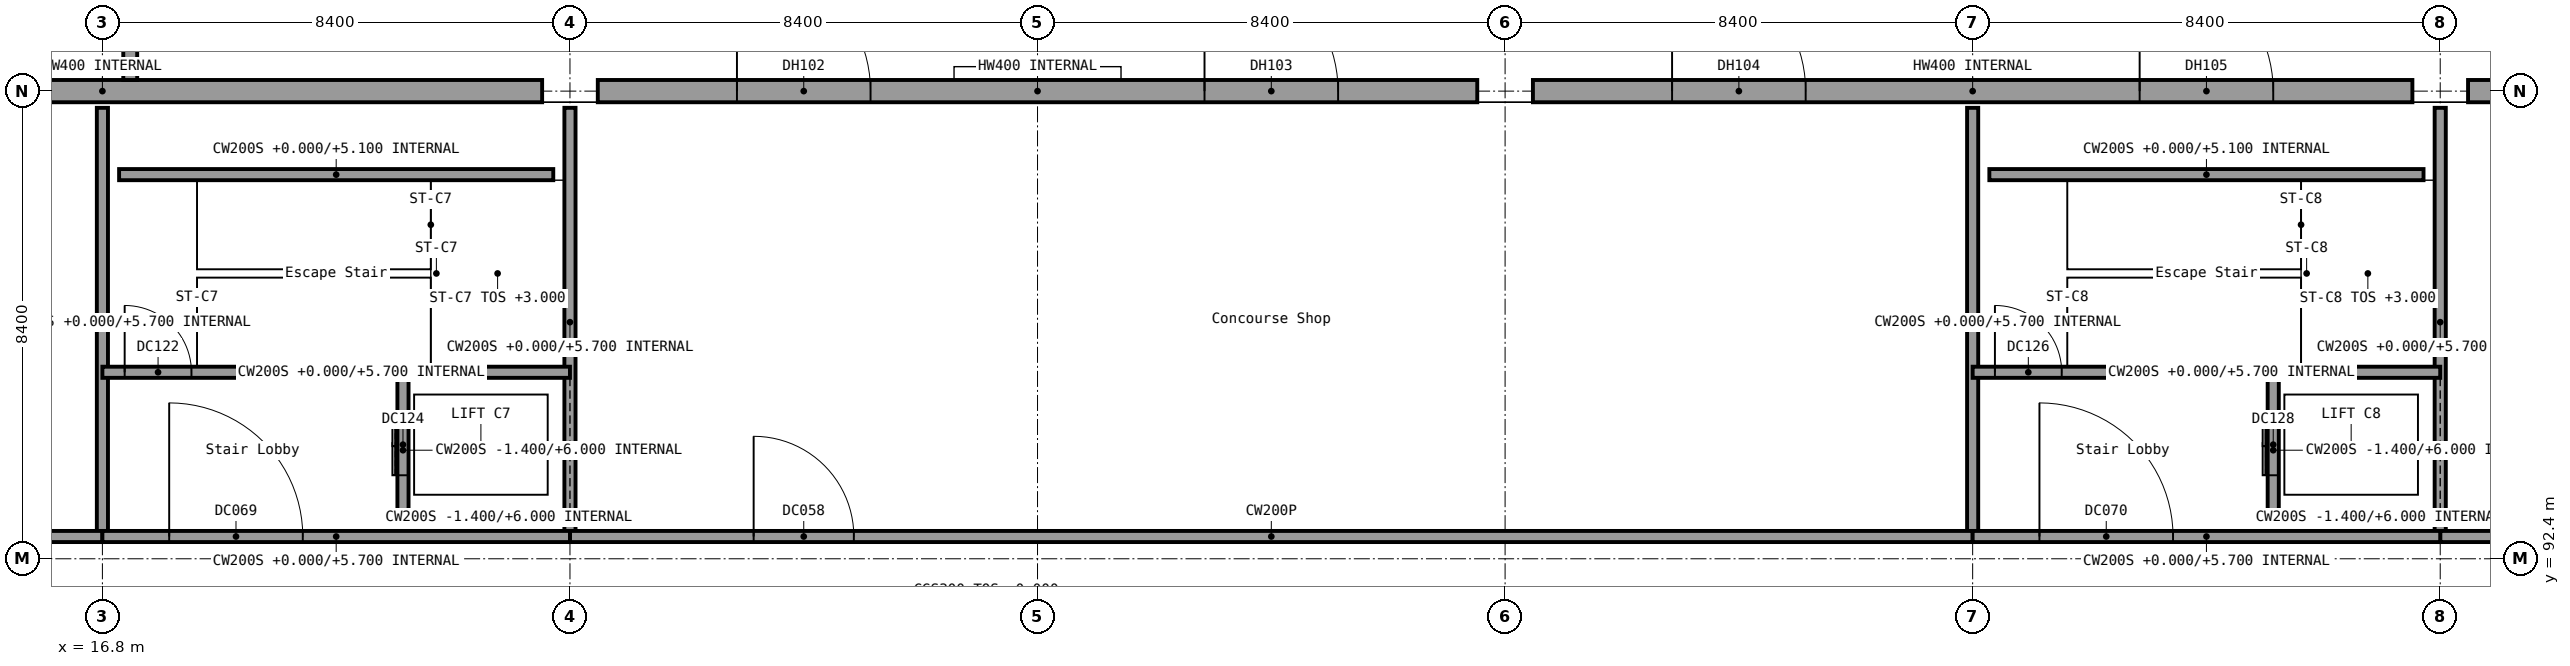
"""IFC4 building model, lengths in metres.
Left out: names, types, materials, properties, quantities, classifications, styles, units other than length and angle.
Written with IfcOpenShell. Run it as: python <this file> out.ifc"""

import sys

from ifc_helpers import new_model, si_unit, direction, frame, frame_2d, origin, origin_2d, place, context, subcontext, project, spatial, rectangle, extrude, element, fill, save


model = new_model("IFC4")
c1 = context("Model", 3, precision=1e-05, world=origin(), true_north=direction((0.0, 1.0)))
c2 = subcontext(c1, "Body", "Model", "MODEL_VIEW")
j1 = project(units=[si_unit("LENGTHUNIT", "METRE"), si_unit("PLANEANGLEUNIT", "RADIAN")], contexts=[c1])
p1 = place(None, origin())
s1 = spatial("IfcSite", under=j1, at=p1, CompositionType="ELEMENT")
p2 = place(p1, origin())
s2 = spatial("IfcBuilding", under=s1, at=p2, CompositionType="ELEMENT")
p3 = place(p2, origin())
s3 = spatial("IfcBuildingStorey", under=s2, at=p3, CompositionType="ELEMENT", Elevation=0.0)
for number, where, z_axis, x_axis in (
    (1, (25.2, 100.8, 0.0), (0.0, 0.0, 1.0), (1.0, 0.0, 0.0)),
    (2, (42.0, 100.8, 0.0), (0.0, 0.0, 1.0), (1.0, 0.0, 0.0)),
    (3, (58.8, 100.8, 0.0), (0.0, 0.0, 1.0), (1.0, 0.0, 0.0)),
):
    element("IfcColumn", number, at=place(p3, frame(where, z_axis=z_axis, x_axis=x_axis)), inside=s3, PredefinedType="COLUMN", context=c2, shape_type="SweptSolid", body=[
        extrude(rectangle(XDim=1.0, YDim=1.6, at=origin_2d()), origin(), (0.0, 0.0, 1.0), 6.0),
    ])
p4 = place(p3, frame((8.9, 100.8, 0.0), z_axis=(0.0, 0.0, 1.0), x_axis=(1.0, 0.0, 0.0)))
e4 = element("IfcWall", 4, at=p4, inside=s3, PredefinedType="STANDARD", context=c2, shape_type="SweptSolid", body=[
    extrude(rectangle(XDim=15.8, YDim=0.4, at=frame_2d((7.9, 0.0))), origin(), (0.0, 0.0, 1.0), 4.5),
])
p5 = place(p4, frame((1.137, 0.0, 0.0)))
e5 = element("IfcOpeningElement", 5, at=p5, cuts=e4, PredefinedType="OPENING", context=c2, shape_type="SweptSolid", body=[
    extrude(rectangle(XDim=1.2, YDim=2.1, at=frame_2d((0.6, 1.05))), frame((0.0, 0.2, 0.0), z_axis=(0.0, -1.0, 0.0), x_axis=(1.0, 0.0, 0.0)), (0.0, 0.0, 1.0), 0.4),
])
p6 = place(p3, frame((25.7, 100.8, 0.0), z_axis=(0.0, 0.0, 1.0), x_axis=(1.0, 0.0, 0.0)))
e6 = element("IfcWall", 6, at=p6, inside=s3, PredefinedType="STANDARD", context=c2, shape_type="SweptSolid", body=[
    extrude(rectangle(XDim=15.8, YDim=0.4, at=frame_2d((7.9, 0.0))), origin(), (0.0, 0.0, 1.0), 4.5),
])
p7 = place(p6, frame((2.5, 0.0, 0.0)))
e7 = element("IfcOpeningElement", 7, at=p7, cuts=e6, PredefinedType="OPENING", context=c2, shape_type="SweptSolid", body=[
    extrude(rectangle(XDim=2.4, YDim=2.4, at=frame_2d((1.2, 1.2))), frame((0.0, 0.2, 0.0), z_axis=(0.0, -1.0, 0.0), x_axis=(1.0, 0.0, 0.0)), (0.0, 0.0, 1.0), 0.4),
])
p8 = place(p6, frame((10.9, 0.0, 0.0)))
e8 = element("IfcOpeningElement", 8, at=p8, cuts=e6, PredefinedType="OPENING", context=c2, shape_type="SweptSolid", body=[
    extrude(rectangle(XDim=2.4, YDim=2.4, at=frame_2d((1.2, 1.2))), frame((0.0, 0.2, 0.0), z_axis=(0.0, -1.0, 0.0), x_axis=(1.0, 0.0, 0.0)), (0.0, 0.0, 1.0), 0.4),
])
p9 = place(p3, frame((42.5, 100.8, 0.0), z_axis=(0.0, 0.0, 1.0), x_axis=(1.0, 0.0, 0.0)))
e9 = element("IfcWall", 9, at=p9, inside=s3, PredefinedType="STANDARD", context=c2, shape_type="SweptSolid", body=[
    extrude(rectangle(XDim=15.8, YDim=0.4, at=frame_2d((7.9, 0.0))), origin(), (0.0, 0.0, 1.0), 4.5),
])
p10 = place(p9, frame((2.5, 0.0, 0.0)))
e10 = element("IfcOpeningElement", 10, at=p10, cuts=e9, PredefinedType="OPENING", context=c2, shape_type="SweptSolid", body=[
    extrude(rectangle(XDim=2.4, YDim=2.4, at=frame_2d((1.2, 1.2))), frame((0.0, 0.2, 0.0), z_axis=(0.0, -1.0, 0.0), x_axis=(1.0, 0.0, 0.0)), (0.0, 0.0, 1.0), 0.4),
])
p11 = place(p9, frame((10.9, 0.0, 0.0)))
e11 = element("IfcOpeningElement", 11, at=p11, cuts=e9, PredefinedType="OPENING", context=c2, shape_type="SweptSolid", body=[
    extrude(rectangle(XDim=2.4, YDim=2.4, at=frame_2d((1.2, 1.2))), frame((0.0, 0.2, 0.0), z_axis=(0.0, -1.0, 0.0), x_axis=(1.0, 0.0, 0.0)), (0.0, 0.0, 1.0), 0.4),
])
p12 = place(p3, frame((59.3, 100.8, 0.0), z_axis=(0.0, 0.0, 1.0), x_axis=(1.0, 0.0, 0.0)))
e12 = element("IfcWall", 12, at=p12, inside=s3, PredefinedType="STANDARD", context=c2, shape_type="SweptSolid", body=[
    extrude(rectangle(XDim=15.8, YDim=0.4, at=frame_2d((7.9, 0.0))), origin(), (0.0, 0.0, 1.0), 4.5),
])
p13 = place(p12, frame((2.5, 0.0, 0.0)))
e13 = element("IfcOpeningElement", 13, at=p13, cuts=e12, PredefinedType="OPENING", context=c2, shape_type="SweptSolid", body=[
    extrude(rectangle(XDim=2.4, YDim=2.4, at=frame_2d((1.2, 1.2))), frame((0.0, 0.2, 0.0), z_axis=(0.0, -1.0, 0.0), x_axis=(1.0, 0.0, 0.0)), (0.0, 0.0, 1.0), 0.4),
])
p14 = place(p12, frame((10.9, 0.0, 0.0)))
e14 = element("IfcOpeningElement", 14, at=p14, cuts=e12, PredefinedType="OPENING", context=c2, shape_type="SweptSolid", body=[
    extrude(rectangle(XDim=2.4, YDim=2.4, at=frame_2d((1.2, 1.2))), frame((0.0, 0.2, 0.0), z_axis=(0.0, -1.0, 0.0), x_axis=(1.0, 0.0, 0.0)), (0.0, 0.0, 1.0), 0.4),
])
p15 = place(p3, frame((17.3, 101.0, 0.0), z_axis=(0.0, 0.0, 1.0), x_axis=(0.0, 1.0, 0.0)))
e15 = element("IfcWall", 15, at=p15, inside=s3, PredefinedType="SHEAR", context=c2, shape_type="SweptSolid", body=[
    extrude(rectangle(XDim=8.2, YDim=0.25, at=frame_2d((4.1, 0.0))), origin(), (0.0, 0.0, 1.0), 5.7),
])
p16 = place(p15, frame((2.0, 0.0, 0.0)))
e16 = element("IfcOpeningElement", 16, at=p16, cuts=e15, PredefinedType="OPENING", context=c2, shape_type="SweptSolid", body=[
    extrude(rectangle(XDim=1.2, YDim=2.1, at=frame_2d((0.6, 1.05))), frame((0.0, 0.125, 0.0), z_axis=(0.0, -1.0, 0.0), x_axis=(1.0, 0.0, 0.0)), (0.0, 0.0, 1.0), 0.25),
])
for number, where, z_axis, x_axis in (
    (17, (16.8, 92.4, 0.0), (0.0, 0.0, 1.0), (1.0, 0.0, 0.0)),
    (18, (25.2, 92.4, 0.0), (0.0, 0.0, 1.0), (1.0, 0.0, 0.0)),
    (19, (33.6, 92.4, 0.0), (0.0, 0.0, 1.0), (1.0, 0.0, 0.0)),
    (20, (42.0, 92.4, 0.0), (0.0, 0.0, 1.0), (1.0, 0.0, 0.0)),
    (21, (50.4, 92.4, 0.0), (0.0, 0.0, 1.0), (1.0, 0.0, 0.0)),
    (22, (58.8, 92.4, 0.0), (0.0, 0.0, 1.0), (1.0, 0.0, 0.0)),
    (23, (16.8, 99.6, 0.0), (0.0, 0.0, 1.0), (1.0, 0.0, 0.0)),
    (24, (25.2, 99.6, 0.0), (0.0, 0.0, 1.0), (1.0, 0.0, 0.0)),
    (25, (33.6, 99.6, 0.0), (0.0, 0.0, 1.0), (1.0, 0.0, 0.0)),
    (26, (42.0, 99.6, 0.0), (0.0, 0.0, 1.0), (1.0, 0.0, 0.0)),
    (27, (50.4, 99.6, 0.0), (0.0, 0.0, 1.0), (1.0, 0.0, 0.0)),
    (28, (58.8, 99.6, 0.0), (0.0, 0.0, 1.0), (1.0, 0.0, 0.0)),
):
    element("IfcColumn", number, at=place(p3, frame(where, z_axis=z_axis, x_axis=x_axis)), inside=s3, PredefinedType="COLUMN", context=c2, shape_type="SweptSolid", body=[
        extrude(rectangle(XDim=0.6, YDim=0.6, at=origin_2d()), origin(), (0.0, 0.0, 1.0), 6.0),
    ])
for number, where, z_axis, x_axis in (
    (29, (16.8, 100.5, 0.0), (0.0, 0.0, 1.0), (0.0, -1.0, 0.0)),
    (30, (25.2, 100.5, 0.0), (0.0, 0.0, 1.0), (0.0, -1.0, 0.0)),
    (31, (50.4, 100.5, 0.0), (0.0, 0.0, 1.0), (0.0, -1.0, 0.0)),
    (32, (58.8, 100.5, 0.0), (0.0, 0.0, 1.0), (0.0, -1.0, 0.0)),
):
    element("IfcWall", number, at=place(p3, frame(where, z_axis=z_axis, x_axis=x_axis)), inside=s3, PredefinedType="SOLIDWALL", context=c2, shape_type="SweptSolid", body=[
        extrude(rectangle(XDim=7.7, YDim=0.2, at=frame_2d((3.85, 0.0))), origin(), (0.0, 0.0, 1.0), 5.7),
    ])
p17 = place(p3, frame((17.1, 99.3, 0.0), z_axis=(0.0, 0.0, 1.0), x_axis=(1.0, 0.0, 0.0)))
e33 = element("IfcWall", 33, at=p17, inside=s3, PredefinedType="SOLIDWALL", context=c2, shape_type="SweptSolid", body=[
    extrude(rectangle(XDim=7.8, YDim=0.2, at=frame_2d((3.9, 0.0))), origin(), (0.0, 0.0, 1.0), 5.1),
])
p18 = place(p3, frame((50.7, 99.3, 0.0), z_axis=(0.0, 0.0, 1.0), x_axis=(1.0, 0.0, 0.0)))
e34 = element("IfcWall", 34, at=p18, inside=s3, PredefinedType="SOLIDWALL", context=c2, shape_type="SweptSolid", body=[
    extrude(rectangle(XDim=7.8, YDim=0.2, at=frame_2d((3.9, 0.0))), origin(), (0.0, 0.0, 1.0), 5.1),
])
p19 = place(p3, frame((0.0, 92.8, 0.0), z_axis=(0.0, 0.0, 1.0), x_axis=(1.0, 0.0, 0.0)))
e35 = element("IfcWall", 35, at=p19, inside=s3, PredefinedType="PARTITIONING", context=c2, shape_type="SweptSolid", body=[
    extrude(rectangle(XDim=16.8, YDim=0.2, at=frame_2d((8.4, 0.0))), origin(), (0.0, 0.0, 1.0), 5.7),
])
p20 = place(p19, frame((3.3, 0.0, 0.0)))
e36 = element("IfcOpeningElement", 36, at=p20, cuts=e35, PredefinedType="OPENING", context=c2, shape_type="SweptSolid", body=[
    extrude(rectangle(XDim=1.8, YDim=2.4, at=frame_2d((0.9, 1.2))), frame((0.0, 0.1, 0.0), z_axis=(0.0, -1.0, 0.0), x_axis=(1.0, 0.0, 0.0)), (0.0, 0.0, 1.0), 0.2),
])
p21 = place(p3, frame((25.2, 92.8, 0.0), z_axis=(0.0, 0.0, 1.0), x_axis=(1.0, 0.0, 0.0)))
e37 = element("IfcWall", 37, at=p21, inside=s3, PredefinedType="PARTITIONING", context=c2, shape_type="SweptSolid", body=[
    extrude(rectangle(XDim=25.2, YDim=0.2, at=frame_2d((12.6, 0.0))), origin(), (0.0, 0.0, 1.0), 5.7),
])
p22 = place(p21, frame((3.3, 0.0, 0.0)))
e38 = element("IfcOpeningElement", 38, at=p22, cuts=e37, PredefinedType="OPENING", context=c2, shape_type="SweptSolid", body=[
    extrude(rectangle(XDim=1.8, YDim=2.4, at=frame_2d((0.9, 1.2))), frame((0.0, 0.1, 0.0), z_axis=(0.0, -1.0, 0.0), x_axis=(1.0, 0.0, 0.0)), (0.0, 0.0, 1.0), 0.2),
])
p23 = place(p3, frame((58.8, 92.8, 0.0), z_axis=(0.0, 0.0, 1.0), x_axis=(1.0, 0.0, 0.0)))
e39 = element("IfcWall", 39, at=p23, inside=s3, PredefinedType="PARTITIONING", context=c2, shape_type="SweptSolid", body=[
    extrude(rectangle(XDim=16.8, YDim=0.2, at=frame_2d((8.4, 0.0))), origin(), (0.0, 0.0, 1.0), 5.7),
])
p24 = place(p23, frame((3.3, 0.0, 0.0)))
e40 = element("IfcOpeningElement", 40, at=p24, cuts=e39, PredefinedType="OPENING", context=c2, shape_type="SweptSolid", body=[
    extrude(rectangle(XDim=1.8, YDim=2.4, at=frame_2d((0.9, 1.2))), frame((0.0, 0.1, 0.0), z_axis=(0.0, -1.0, 0.0), x_axis=(1.0, 0.0, 0.0)), (0.0, 0.0, 1.0), 0.2),
])
p25 = place(p23, frame((14.8, 0.0, 0.0)))
e41 = element("IfcOpeningElement", 41, at=p25, cuts=e39, PredefinedType="OPENING", context=c2, shape_type="SweptSolid", body=[
    extrude(rectangle(XDim=1.0, YDim=2.4, at=frame_2d((0.5, 1.2))), frame((0.0, 0.1, 0.0), z_axis=(0.0, -1.0, 0.0), x_axis=(1.0, 0.0, 0.0)), (0.0, 0.0, 1.0), 0.2),
])
p26 = place(p3, frame((16.8, 92.8, 0.0), z_axis=(0.0, 0.0, 1.0), x_axis=(1.0, 0.0, 0.0)))
e42 = element("IfcWall", 42, at=p26, inside=s3, PredefinedType="SOLIDWALL", context=c2, shape_type="SweptSolid", body=[
    extrude(rectangle(XDim=8.4, YDim=0.2, at=frame_2d((4.2, 0.0))), origin(), (0.0, 0.0, 1.0), 5.7),
])
p27 = place(p26, frame((1.2, 0.0, 0.0)))
e43 = element("IfcOpeningElement", 43, at=p27, cuts=e42, PredefinedType="OPENING", context=c2, shape_type="SweptSolid", body=[
    extrude(rectangle(XDim=2.4, YDim=2.4, at=frame_2d((1.2, 1.2))), frame((0.0, 0.1, 0.0), z_axis=(0.0, -1.0, 0.0), x_axis=(1.0, 0.0, 0.0)), (0.0, 0.0, 1.0), 0.2),
])
p28 = place(p3, frame((50.4, 92.8, 0.0), z_axis=(0.0, 0.0, 1.0), x_axis=(1.0, 0.0, 0.0)))
e44 = element("IfcWall", 44, at=p28, inside=s3, PredefinedType="SOLIDWALL", context=c2, shape_type="SweptSolid", body=[
    extrude(rectangle(XDim=8.4, YDim=0.2, at=frame_2d((4.2, 0.0))), origin(), (0.0, 0.0, 1.0), 5.7),
])
p29 = place(p28, frame((1.2, 0.0, 0.0)))
e45 = element("IfcOpeningElement", 45, at=p29, cuts=e44, PredefinedType="OPENING", context=c2, shape_type="SweptSolid", body=[
    extrude(rectangle(XDim=2.4, YDim=2.4, at=frame_2d((1.2, 1.2))), frame((0.0, 0.1, 0.0), z_axis=(0.0, -1.0, 0.0), x_axis=(1.0, 0.0, 0.0)), (0.0, 0.0, 1.0), 0.2),
])
p30 = place(p3, frame((16.8, 95.75, 0.0), z_axis=(0.0, 0.0, 1.0), x_axis=(1.0, 0.0, 0.0)))
e46 = element("IfcWall", 46, at=p30, inside=s3, PredefinedType="SOLIDWALL", context=c2, shape_type="SweptSolid", body=[
    extrude(rectangle(XDim=8.4, YDim=0.2, at=frame_2d((4.2, 0.0))), origin(), (0.0, 0.0, 1.0), 5.7),
])
p31 = place(p30, frame((0.4, 0.0, 0.0)))
e47 = element("IfcOpeningElement", 47, at=p31, cuts=e46, PredefinedType="OPENING", context=c2, shape_type="SweptSolid", body=[
    extrude(rectangle(XDim=1.2, YDim=2.4, at=frame_2d((0.6, 1.2))), frame((0.0, 0.1, 0.0), z_axis=(0.0, -1.0, 0.0), x_axis=(1.0, 0.0, 0.0)), (0.0, 0.0, 1.0), 0.2),
])
p32 = place(p3, frame((22.2, 93.05, -1.4), z_axis=(0.0, 0.0, 1.0), x_axis=(0.0, 1.0, 0.0)))
e48 = element("IfcWall", 48, at=p32, inside=s3, PredefinedType="SOLIDWALL", context=c2, shape_type="SweptSolid", body=[
    extrude(rectangle(XDim=2.6, YDim=0.2, at=frame_2d((1.3, 0.0))), origin(), (0.0, 0.0, 1.0), 7.4),
])
p33 = place(p32, frame((0.85, 0.0, 1.4)))
e49 = element("IfcOpeningElement", 49, at=p33, cuts=e48, PredefinedType="OPENING", context=c2, shape_type="SweptSolid", body=[
    extrude(rectangle(XDim=1.1, YDim=2.1, at=frame_2d((0.55, 1.05))), frame((0.0, 0.1, 0.0), z_axis=(0.0, -1.0, 0.0), x_axis=(1.0, 0.0, 0.0)), (0.0, 0.0, 1.0), 0.2),
])
p34 = place(p3, frame((22.1, 93.15, -1.4), z_axis=(0.0, 0.0, 1.0), x_axis=(1.0, 0.0, 0.0)))
e50 = element("IfcWall", 50, at=p34, inside=s3, PredefinedType="SOLIDWALL", context=c2, shape_type="SweptSolid", body=[
    extrude(rectangle(XDim=3.1, YDim=0.2, at=frame_2d((1.55, 0.0))), origin(), (0.0, 0.0, 1.0), 7.4),
])
p35 = place(p3, frame((50.4, 95.75, 0.0), z_axis=(0.0, 0.0, 1.0), x_axis=(1.0, 0.0, 0.0)))
e51 = element("IfcWall", 51, at=p35, inside=s3, PredefinedType="SOLIDWALL", context=c2, shape_type="SweptSolid", body=[
    extrude(rectangle(XDim=8.4, YDim=0.2, at=frame_2d((4.2, 0.0))), origin(), (0.0, 0.0, 1.0), 5.7),
])
p36 = place(p35, frame((0.4, 0.0, 0.0)))
e52 = element("IfcOpeningElement", 52, at=p36, cuts=e51, PredefinedType="OPENING", context=c2, shape_type="SweptSolid", body=[
    extrude(rectangle(XDim=1.2, YDim=2.4, at=frame_2d((0.6, 1.2))), frame((0.0, 0.1, 0.0), z_axis=(0.0, -1.0, 0.0), x_axis=(1.0, 0.0, 0.0)), (0.0, 0.0, 1.0), 0.2),
])
p37 = place(p3, frame((55.8, 93.05, -1.4), z_axis=(0.0, 0.0, 1.0), x_axis=(0.0, 1.0, 0.0)))
e53 = element("IfcWall", 53, at=p37, inside=s3, PredefinedType="SOLIDWALL", context=c2, shape_type="SweptSolid", body=[
    extrude(rectangle(XDim=2.6, YDim=0.2, at=frame_2d((1.3, 0.0))), origin(), (0.0, 0.0, 1.0), 7.4),
])
p38 = place(p37, frame((0.85, 0.0, 1.4)))
e54 = element("IfcOpeningElement", 54, at=p38, cuts=e53, PredefinedType="OPENING", context=c2, shape_type="SweptSolid", body=[
    extrude(rectangle(XDim=1.1, YDim=2.1, at=frame_2d((0.55, 1.05))), frame((0.0, 0.1, 0.0), z_axis=(0.0, -1.0, 0.0), x_axis=(1.0, 0.0, 0.0)), (0.0, 0.0, 1.0), 0.2),
])
p39 = place(p3, frame((55.7, 93.15, -1.4), z_axis=(0.0, 0.0, 1.0), x_axis=(1.0, 0.0, 0.0)))
e55 = element("IfcWall", 55, at=p39, inside=s3, PredefinedType="SOLIDWALL", context=c2, shape_type="SweptSolid", body=[
    extrude(rectangle(XDim=3.1, YDim=0.2, at=frame_2d((1.55, 0.0))), origin(), (0.0, 0.0, 1.0), 7.4),
])
p40 = place(p7, origin())
e56 = element("IfcDoor", 56, at=p40, inside=s3, OperationType="DOUBLE_DOOR_SINGLE_SWING", PredefinedType="DOOR", context=c2, shape_type="SweptSolid", body=[
    extrude(rectangle(XDim=2.4, YDim=2.4, at=frame_2d((1.2, 1.2))), frame((0.0, 0.025, 0.0), z_axis=(0.0, -1.0, 0.0), x_axis=(1.0, 0.0, 0.0)), (0.0, 0.0, 1.0), 0.05),
])
fill(e7, e56)
p41 = place(p8, origin())
e57 = element("IfcDoor", 57, at=p41, inside=s3, OperationType="DOUBLE_DOOR_SINGLE_SWING", PredefinedType="DOOR", context=c2, shape_type="SweptSolid", body=[
    extrude(rectangle(XDim=2.4, YDim=2.4, at=frame_2d((1.2, 1.2))), frame((0.0, 0.025, 0.0), z_axis=(0.0, -1.0, 0.0), x_axis=(1.0, 0.0, 0.0)), (0.0, 0.0, 1.0), 0.05),
])
fill(e8, e57)
p42 = place(p10, origin())
e58 = element("IfcDoor", 58, at=p42, inside=s3, OperationType="DOUBLE_DOOR_SINGLE_SWING", PredefinedType="DOOR", context=c2, shape_type="SweptSolid", body=[
    extrude(rectangle(XDim=2.4, YDim=2.4, at=frame_2d((1.2, 1.2))), frame((0.0, 0.025, 0.0), z_axis=(0.0, -1.0, 0.0), x_axis=(1.0, 0.0, 0.0)), (0.0, 0.0, 1.0), 0.05),
])
fill(e10, e58)
p43 = place(p11, origin())
e59 = element("IfcDoor", 59, at=p43, inside=s3, OperationType="DOUBLE_DOOR_SINGLE_SWING", PredefinedType="DOOR", context=c2, shape_type="SweptSolid", body=[
    extrude(rectangle(XDim=2.4, YDim=2.4, at=frame_2d((1.2, 1.2))), frame((0.0, 0.025, 0.0), z_axis=(0.0, -1.0, 0.0), x_axis=(1.0, 0.0, 0.0)), (0.0, 0.0, 1.0), 0.05),
])
fill(e11, e59)
p44 = place(p22, origin())
e60 = element("IfcDoor", 60, at=p44, inside=s3, OperationType="DOUBLE_DOOR_DOUBLE_SWING", PredefinedType="DOOR", context=c2, shape_type="SweptSolid", body=[
    extrude(rectangle(XDim=1.8, YDim=2.4, at=frame_2d((0.9, 1.2))), frame((0.0, 0.025, 0.0), z_axis=(0.0, -1.0, 0.0), x_axis=(1.0, 0.0, 0.0)), (0.0, 0.0, 1.0), 0.05),
])
fill(e38, e60)
p45 = place(p27, origin())
e61 = element("IfcDoor", 61, at=p45, inside=s3, OperationType="DOUBLE_DOOR_DOUBLE_SWING", PredefinedType="DOOR", context=c2, shape_type="SweptSolid", body=[
    extrude(rectangle(XDim=2.4, YDim=2.4, at=frame_2d((1.2, 1.2))), frame((0.0, 0.025, 0.0), z_axis=(0.0, -1.0, 0.0), x_axis=(1.0, 0.0, 0.0)), (0.0, 0.0, 1.0), 0.05),
])
fill(e43, e61)
p46 = place(p29, origin())
e62 = element("IfcDoor", 62, at=p46, inside=s3, OperationType="DOUBLE_DOOR_DOUBLE_SWING", PredefinedType="DOOR", context=c2, shape_type="SweptSolid", body=[
    extrude(rectangle(XDim=2.4, YDim=2.4, at=frame_2d((1.2, 1.2))), frame((0.0, 0.025, 0.0), z_axis=(0.0, -1.0, 0.0), x_axis=(1.0, 0.0, 0.0)), (0.0, 0.0, 1.0), 0.05),
])
fill(e45, e62)
p47 = place(p31, origin())
e63 = element("IfcDoor", 63, at=p47, inside=s3, OperationType="SINGLE_SWING_LEFT", PredefinedType="DOOR", context=c2, shape_type="SweptSolid", body=[
    extrude(rectangle(XDim=1.2, YDim=2.4, at=frame_2d((0.6, 1.2))), frame((0.0, 0.025, 0.0), z_axis=(0.0, -1.0, 0.0), x_axis=(1.0, 0.0, 0.0)), (0.0, 0.0, 1.0), 0.05),
])
fill(e47, e63)
p48 = place(p33, origin())
e64 = element("IfcDoor", 64, at=p48, inside=s3, OperationType="DOUBLE_DOOR_SLIDING", PredefinedType="DOOR", context=c2, shape_type="SweptSolid", body=[
    extrude(rectangle(XDim=1.1, YDim=2.1, at=frame_2d((0.55, 1.05))), frame((0.0, 0.025, 0.0), z_axis=(0.0, -1.0, 0.0), x_axis=(1.0, 0.0, 0.0)), (0.0, 0.0, 1.0), 0.05),
])
fill(e49, e64)
p49 = place(p36, origin())
e65 = element("IfcDoor", 65, at=p49, inside=s3, OperationType="SINGLE_SWING_LEFT", PredefinedType="DOOR", context=c2, shape_type="SweptSolid", body=[
    extrude(rectangle(XDim=1.2, YDim=2.4, at=frame_2d((0.6, 1.2))), frame((0.0, 0.025, 0.0), z_axis=(0.0, -1.0, 0.0), x_axis=(1.0, 0.0, 0.0)), (0.0, 0.0, 1.0), 0.05),
])
fill(e52, e65)
p50 = place(p38, origin())
e66 = element("IfcDoor", 66, at=p50, inside=s3, OperationType="DOUBLE_DOOR_SLIDING", PredefinedType="DOOR", context=c2, shape_type="SweptSolid", body=[
    extrude(rectangle(XDim=1.1, YDim=2.1, at=frame_2d((0.55, 1.05))), frame((0.0, 0.025, 0.0), z_axis=(0.0, -1.0, 0.0), x_axis=(1.0, 0.0, 0.0)), (0.0, 0.0, 1.0), 0.05),
])
fill(e54, e66)
save(model, sys.argv[1])
